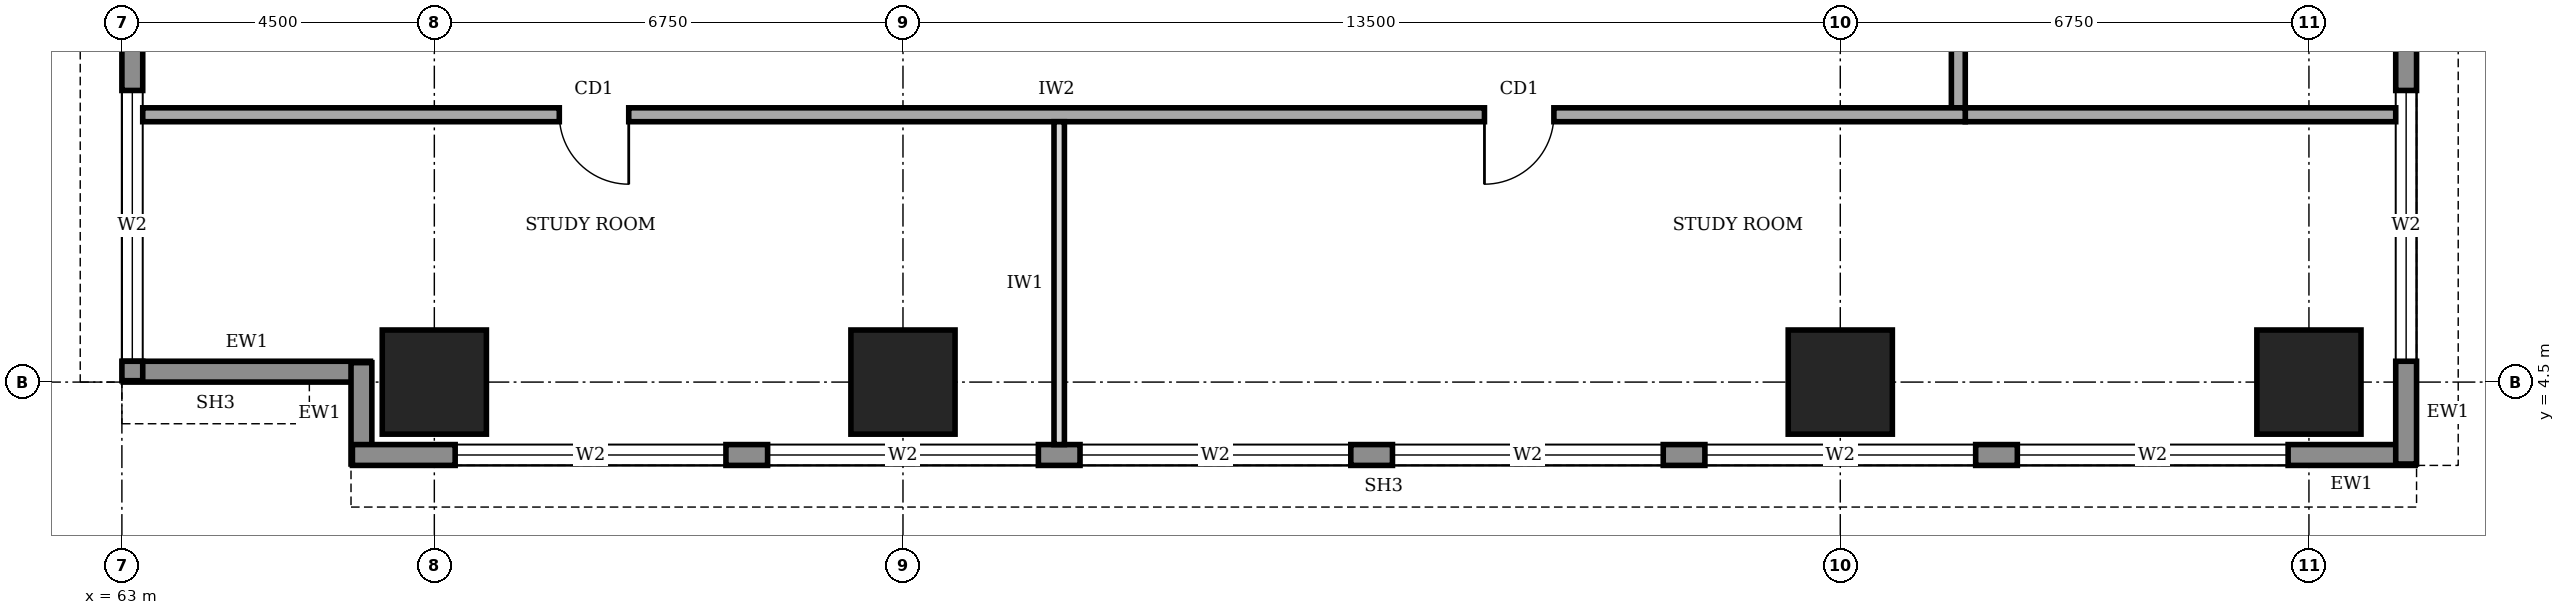
"""IFC4 building model, lengths in metres.
Left out: names, types, materials, properties, quantities, classifications, styles, units other than length and angle.
Written with IfcOpenShell. Run it as: python <this file> out.ifc"""

import sys

from ifc_helpers import new_model, si_unit, direction, frame, frame_2d, origin, origin_2d, place, context, subcontext, project, spatial, rectangle, extrude, element, fill, save


model = new_model("IFC4")
c1 = context("Model", 3, precision=1e-05, world=origin(), true_north=direction((0.0, 1.0)))
c2 = subcontext(c1, "Body", "Model", "MODEL_VIEW")
j1 = project(units=[si_unit("LENGTHUNIT", "METRE"), si_unit("PLANEANGLEUNIT", "RADIAN")], contexts=[c1])
p1 = place(None, origin())
s1 = spatial("IfcSite", under=j1, at=p1, CompositionType="ELEMENT")
p2 = place(p1, origin())
s2 = spatial("IfcBuilding", under=s1, at=p2, CompositionType="ELEMENT")
p3 = place(p2, frame((0.0, 0.0, 153.0)))
s3 = spatial("IfcBuildingStorey", under=s2, at=p3, CompositionType="ELEMENT", Elevation=153.0)
for number, where, z_axis, x_axis in (
    (1, (67.5, 4.5, 0.0), (0.0, 0.0, 1.0), (1.0, 0.0, 0.0)),
    (2, (74.25, 4.5, 0.0), (0.0, 0.0, 1.0), (1.0, 0.0, 0.0)),
    (3, (87.75, 4.5, 0.0), (0.0, 0.0, 1.0), (1.0, 0.0, 0.0)),
    (4, (94.5, 4.5, 0.0), (0.0, 0.0, 1.0), (1.0, 0.0, 0.0)),
):
    element("IfcColumn", number, at=place(p3, frame(where, z_axis=z_axis, x_axis=x_axis)), inside=s3, PredefinedType="COLUMN", context=c2, shape_type="SweptSolid", body=[
        extrude(rectangle(XDim=1.5, YDim=1.5, at=origin_2d()), origin(), (0.0, 0.0, 1.0), 4.0),
    ])
p4 = place(p3, frame((63.02, 4.65, 0.0), z_axis=(0.0, 0.0, 1.0), x_axis=(1.0, 0.0, 0.0)))
e5 = element("IfcWall", 5, at=p4, inside=s3, PredefinedType="STANDARD", context=c2, shape_type="SweptSolid", body=[
    extrude(rectangle(XDim=3.56, YDim=0.3, at=frame_2d((1.78, 0.0))), origin(), (0.0, 0.0, 1.0), 2.85),
])
p5 = place(p3, frame((66.45, 4.78, 0.0), z_axis=(0.0, 0.0, 1.0), x_axis=(0.0, -1.0, 0.0)))
e6 = element("IfcWall", 6, at=p5, inside=s3, PredefinedType="STANDARD", context=c2, shape_type="SweptSolid", body=[
    extrude(rectangle(XDim=1.46, YDim=0.3, at=frame_2d((0.73, 0.0))), origin(), (0.0, 0.0, 1.0), 3.75),
])
p6 = place(p3, frame((66.32, 3.45, 0.0), z_axis=(0.0, 0.0, 1.0), x_axis=(1.0, 0.0, 0.0)))
e7 = element("IfcWall", 7, at=p6, inside=s3, PredefinedType="STANDARD", context=c2, shape_type="SweptSolid", body=[
    extrude(rectangle(XDim=29.71, YDim=0.3, at=frame_2d((14.855, 0.0))), origin(), (0.0, 0.0, 1.0), 3.75),
])
p7 = place(p6, frame((1.48, 0.0, 0.6)))
e8 = element("IfcOpeningElement", 8, at=p7, cuts=e7, PredefinedType="OPENING", context=c2, shape_type="SweptSolid", body=[
    extrude(rectangle(XDim=3.9, YDim=2.6, at=frame_2d((1.95, 1.3))), frame((0.0, 0.16, 0.0), z_axis=(0.0, -1.0, 0.0), x_axis=(1.0, 0.0, 0.0)), (0.0, 0.0, 1.0), 0.32),
])
p8 = place(p6, frame((5.98, 0.0, 0.6)))
e9 = element("IfcOpeningElement", 9, at=p8, cuts=e7, PredefinedType="OPENING", context=c2, shape_type="SweptSolid", body=[
    extrude(rectangle(XDim=3.9, YDim=2.6, at=frame_2d((1.95, 1.3))), frame((0.0, 0.16, 0.0), z_axis=(0.0, -1.0, 0.0), x_axis=(1.0, 0.0, 0.0)), (0.0, 0.0, 1.0), 0.32),
])
p9 = place(p6, frame((10.48, 0.0, 0.6)))
e10 = element("IfcOpeningElement", 10, at=p9, cuts=e7, PredefinedType="OPENING", context=c2, shape_type="SweptSolid", body=[
    extrude(rectangle(XDim=3.9, YDim=2.6, at=frame_2d((1.95, 1.3))), frame((0.0, 0.16, 0.0), z_axis=(0.0, -1.0, 0.0), x_axis=(1.0, 0.0, 0.0)), (0.0, 0.0, 1.0), 0.32),
])
p10 = place(p6, frame((14.98, 0.0, 0.6)))
e11 = element("IfcOpeningElement", 11, at=p10, cuts=e7, PredefinedType="OPENING", context=c2, shape_type="SweptSolid", body=[
    extrude(rectangle(XDim=3.9, YDim=2.6, at=frame_2d((1.95, 1.3))), frame((0.0, 0.16, 0.0), z_axis=(0.0, -1.0, 0.0), x_axis=(1.0, 0.0, 0.0)), (0.0, 0.0, 1.0), 0.32),
])
p11 = place(p6, frame((19.48, 0.0, 0.6)))
e12 = element("IfcOpeningElement", 12, at=p11, cuts=e7, PredefinedType="OPENING", context=c2, shape_type="SweptSolid", body=[
    extrude(rectangle(XDim=3.9, YDim=2.6, at=frame_2d((1.95, 1.3))), frame((0.0, 0.16, 0.0), z_axis=(0.0, -1.0, 0.0), x_axis=(1.0, 0.0, 0.0)), (0.0, 0.0, 1.0), 0.32),
])
p12 = place(p6, frame((23.98, 0.0, 0.6)))
e13 = element("IfcOpeningElement", 13, at=p12, cuts=e7, PredefinedType="OPENING", context=c2, shape_type="SweptSolid", body=[
    extrude(rectangle(XDim=3.9, YDim=2.6, at=frame_2d((1.95, 1.3))), frame((0.0, 0.16, 0.0), z_axis=(0.0, -1.0, 0.0), x_axis=(1.0, 0.0, 0.0)), (0.0, 0.0, 1.0), 0.32),
])
p13 = place(p3, frame((95.9, 3.32, 0.0), z_axis=(0.0, 0.0, 1.0), x_axis=(0.0, 1.0, 0.0)))
e14 = element("IfcWall", 14, at=p13, inside=s3, PredefinedType="STANDARD", context=c2, shape_type="SweptSolid", body=[
    extrude(rectangle(XDim=33.86, YDim=0.3, at=frame_2d((16.93, 0.0))), origin(), (0.0, 0.0, 1.0), 3.75),
])
p14 = place(p13, frame((1.48, 0.0, 0.6)))
e15 = element("IfcOpeningElement", 15, at=p14, cuts=e14, PredefinedType="OPENING", context=c2, shape_type="SweptSolid", body=[
    extrude(rectangle(XDim=3.9, YDim=2.6, at=frame_2d((1.95, 1.3))), frame((0.0, 0.16, 0.0), z_axis=(0.0, -1.0, 0.0), x_axis=(1.0, 0.0, 0.0)), (0.0, 0.0, 1.0), 0.32),
])
p15 = place(p13, frame((5.98, 0.0, 0.6)))
e16 = element("IfcOpeningElement", 16, at=p15, cuts=e14, PredefinedType="OPENING", context=c2, shape_type="SweptSolid", body=[
    extrude(rectangle(XDim=3.9, YDim=2.6, at=frame_2d((1.95, 1.3))), frame((0.0, 0.16, 0.0), z_axis=(0.0, -1.0, 0.0), x_axis=(1.0, 0.0, 0.0)), (0.0, 0.0, 1.0), 0.32),
])
p16 = place(p13, frame((10.48, 0.0, 0.6)))
e17 = element("IfcOpeningElement", 17, at=p16, cuts=e14, PredefinedType="OPENING", context=c2, shape_type="SweptSolid", body=[
    extrude(rectangle(XDim=3.9, YDim=2.6, at=frame_2d((1.95, 1.3))), frame((0.0, 0.16, 0.0), z_axis=(0.0, -1.0, 0.0), x_axis=(1.0, 0.0, 0.0)), (0.0, 0.0, 1.0), 0.32),
])
p17 = place(p13, frame((14.98, 0.0, 0.6)))
e18 = element("IfcOpeningElement", 18, at=p17, cuts=e14, PredefinedType="OPENING", context=c2, shape_type="SweptSolid", body=[
    extrude(rectangle(XDim=3.9, YDim=2.6, at=frame_2d((1.95, 1.3))), frame((0.0, 0.16, 0.0), z_axis=(0.0, -1.0, 0.0), x_axis=(1.0, 0.0, 0.0)), (0.0, 0.0, 1.0), 0.32),
])
p18 = place(p13, frame((19.48, 0.0, 0.6)))
e19 = element("IfcOpeningElement", 19, at=p18, cuts=e14, PredefinedType="OPENING", context=c2, shape_type="SweptSolid", body=[
    extrude(rectangle(XDim=3.9, YDim=2.6, at=frame_2d((1.95, 1.3))), frame((0.0, 0.16, 0.0), z_axis=(0.0, -1.0, 0.0), x_axis=(1.0, 0.0, 0.0)), (0.0, 0.0, 1.0), 0.32),
])
p19 = place(p13, frame((23.98, 0.0, 0.6)))
e20 = element("IfcOpeningElement", 20, at=p19, cuts=e14, PredefinedType="OPENING", context=c2, shape_type="SweptSolid", body=[
    extrude(rectangle(XDim=3.9, YDim=2.6, at=frame_2d((1.95, 1.3))), frame((0.0, 0.16, 0.0), z_axis=(0.0, -1.0, 0.0), x_axis=(1.0, 0.0, 0.0)), (0.0, 0.0, 1.0), 0.32),
])
p20 = place(p13, frame((28.48, 0.0, 0.6)))
e21 = element("IfcOpeningElement", 21, at=p20, cuts=e14, PredefinedType="OPENING", context=c2, shape_type="SweptSolid", body=[
    extrude(rectangle(XDim=3.9, YDim=2.6, at=frame_2d((1.95, 1.3))), frame((0.0, 0.16, 0.0), z_axis=(0.0, -1.0, 0.0), x_axis=(1.0, 0.0, 0.0)), (0.0, 0.0, 1.0), 0.32),
])
p21 = place(p3, frame((63.15, 35.98, 0.0), z_axis=(0.0, 0.0, 1.0), x_axis=(0.0, -1.0, 0.0)))
e22 = element("IfcWall", 22, at=p21, inside=s3, PredefinedType="STANDARD", context=c2, shape_type="SweptSolid", body=[
    extrude(rectangle(XDim=31.46, YDim=0.3, at=frame_2d((15.73, 0.0))), origin(), (0.0, 0.0, 1.0), 3.75),
])
p22 = place(p21, frame((27.28, 0.0, 0.6)))
e23 = element("IfcOpeningElement", 23, at=p22, cuts=e22, PredefinedType="OPENING", context=c2, shape_type="SweptSolid", body=[
    extrude(rectangle(XDim=3.9, YDim=2.6, at=frame_2d((1.95, 1.3))), frame((0.0, 0.16, 0.0), z_axis=(0.0, -1.0, 0.0), x_axis=(1.0, 0.0, 0.0)), (0.0, 0.0, 1.0), 0.32),
])
p23 = place(p21, frame((22.78, 0.0, 0.6)))
e24 = element("IfcOpeningElement", 24, at=p23, cuts=e22, PredefinedType="OPENING", context=c2, shape_type="SweptSolid", body=[
    extrude(rectangle(XDim=3.9, YDim=2.6, at=frame_2d((1.95, 1.3))), frame((0.0, 0.16, 0.0), z_axis=(0.0, -1.0, 0.0), x_axis=(1.0, 0.0, 0.0)), (0.0, 0.0, 1.0), 0.32),
])
p24 = place(p21, frame((18.28, 0.0, 0.6)))
e25 = element("IfcOpeningElement", 25, at=p24, cuts=e22, PredefinedType="OPENING", context=c2, shape_type="SweptSolid", body=[
    extrude(rectangle(XDim=3.9, YDim=2.6, at=frame_2d((1.95, 1.3))), frame((0.0, 0.16, 0.0), z_axis=(0.0, -1.0, 0.0), x_axis=(1.0, 0.0, 0.0)), (0.0, 0.0, 1.0), 0.32),
])
p25 = place(p21, frame((13.78, 0.0, 0.6)))
e26 = element("IfcOpeningElement", 26, at=p25, cuts=e22, PredefinedType="OPENING", context=c2, shape_type="SweptSolid", body=[
    extrude(rectangle(XDim=3.9, YDim=2.6, at=frame_2d((1.95, 1.3))), frame((0.0, 0.16, 0.0), z_axis=(0.0, -1.0, 0.0), x_axis=(1.0, 0.0, 0.0)), (0.0, 0.0, 1.0), 0.32),
])
p26 = place(p21, frame((9.28, 0.0, 0.6)))
e27 = element("IfcOpeningElement", 27, at=p26, cuts=e22, PredefinedType="OPENING", context=c2, shape_type="SweptSolid", body=[
    extrude(rectangle(XDim=3.9, YDim=2.6, at=frame_2d((1.95, 1.3))), frame((0.0, 0.16, 0.0), z_axis=(0.0, -1.0, 0.0), x_axis=(1.0, 0.0, 0.0)), (0.0, 0.0, 1.0), 0.32),
])
p27 = place(p21, frame((4.78, 0.0, 0.6)))
e28 = element("IfcOpeningElement", 28, at=p27, cuts=e22, PredefinedType="OPENING", context=c2, shape_type="SweptSolid", body=[
    extrude(rectangle(XDim=3.9, YDim=2.6, at=frame_2d((1.95, 1.3))), frame((0.0, 0.16, 0.0), z_axis=(0.0, -1.0, 0.0), x_axis=(1.0, 0.0, 0.0)), (0.0, 0.0, 1.0), 0.32),
])
p28 = place(p3, frame((63.3, 8.35, 0.0), z_axis=(0.0, 0.0, 1.0), x_axis=(1.0, 0.0, 0.0)))
e29 = element("IfcWall", 29, at=p28, inside=s3, PredefinedType="SOLIDWALL", context=c2, shape_type="SweptSolid", body=[
    extrude(rectangle(XDim=26.25, YDim=0.2, at=frame_2d((13.125, 0.0))), origin(), (0.0, 0.0, 1.0), 3.75),
])
p29 = place(p28, frame((6.0, 0.0, 0.0)))
e30 = element("IfcOpeningElement", 30, at=p29, cuts=e29, PredefinedType="OPENING", context=c2, shape_type="SweptSolid", body=[
    extrude(rectangle(XDim=1.0, YDim=2.1, at=frame_2d((0.5, 1.05))), frame((0.0, 0.11, 0.0), z_axis=(0.0, -1.0, 0.0), x_axis=(1.0, 0.0, 0.0)), (0.0, 0.0, 1.0), 0.22),
])
p30 = place(p28, frame((19.325, 0.0, 0.0)))
e31 = element("IfcOpeningElement", 31, at=p30, cuts=e29, PredefinedType="OPENING", context=c2, shape_type="SweptSolid", body=[
    extrude(rectangle(XDim=1.0, YDim=2.1, at=frame_2d((0.5, 1.05))), frame((0.0, 0.11, 0.0), z_axis=(0.0, -1.0, 0.0), x_axis=(1.0, 0.0, 0.0)), (0.0, 0.0, 1.0), 0.22),
])
p31 = place(p3, frame((89.45, 8.45, 0.0), z_axis=(0.0, 0.0, 1.0), x_axis=(0.0, 1.0, 0.0)))
e32 = element("IfcWall", 32, at=p31, inside=s3, PredefinedType="SOLIDWALL", context=c2, shape_type="SweptSolid", body=[
    extrude(rectangle(XDim=23.8, YDim=0.2, at=frame_2d((11.9, 0.0))), origin(), (0.0, 0.0, 1.0), 3.75),
])
p32 = place(p31, frame((1.925, 0.0, 0.0)))
e33 = element("IfcOpeningElement", 33, at=p32, cuts=e32, PredefinedType="OPENING", context=c2, shape_type="SweptSolid", body=[
    extrude(rectangle(XDim=1.0, YDim=2.1, at=frame_2d((0.5, 1.05))), frame((0.0, 0.11, 0.0), z_axis=(0.0, -1.0, 0.0), x_axis=(1.0, 0.0, 0.0)), (0.0, 0.0, 1.0), 0.22),
])
p33 = place(p31, frame((5.65, 0.0, 0.0)))
e34 = element("IfcOpeningElement", 34, at=p33, cuts=e32, PredefinedType="OPENING", context=c2, shape_type="SweptSolid", body=[
    extrude(rectangle(XDim=1.0, YDim=2.1, at=frame_2d((0.5, 1.05))), frame((0.0, 0.11, 0.0), z_axis=(0.0, -1.0, 0.0), x_axis=(1.0, 0.0, 0.0)), (0.0, 0.0, 1.0), 0.22),
])
p34 = place(p31, frame((8.75, 0.0, 0.0)))
e35 = element("IfcOpeningElement", 35, at=p34, cuts=e32, PredefinedType="OPENING", context=c2, shape_type="SweptSolid", body=[
    extrude(rectangle(XDim=0.9, YDim=2.1, at=frame_2d((0.45, 1.05))), frame((0.0, 0.11, 0.0), z_axis=(0.0, -1.0, 0.0), x_axis=(1.0, 0.0, 0.0)), (0.0, 0.0, 1.0), 0.22),
])
p35 = place(p31, frame((11.8, 0.0, 0.0)))
e36 = element("IfcOpeningElement", 36, at=p35, cuts=e32, PredefinedType="OPENING", context=c2, shape_type="SweptSolid", body=[
    extrude(rectangle(XDim=0.9, YDim=2.1, at=frame_2d((0.45, 1.05))), frame((0.0, 0.11, 0.0), z_axis=(0.0, -1.0, 0.0), x_axis=(1.0, 0.0, 0.0)), (0.0, 0.0, 1.0), 0.22),
])
p36 = place(p31, frame((16.5, 0.0, 0.0)))
e37 = element("IfcOpeningElement", 37, at=p36, cuts=e32, PredefinedType="OPENING", context=c2, shape_type="SweptSolid", body=[
    extrude(rectangle(XDim=0.9, YDim=2.1, at=frame_2d((0.45, 1.05))), frame((0.0, 0.11, 0.0), z_axis=(0.0, -1.0, 0.0), x_axis=(1.0, 0.0, 0.0)), (0.0, 0.0, 1.0), 0.22),
])
p37 = place(p31, frame((13.85, 0.0, 0.0)))
e38 = element("IfcOpeningElement", 38, at=p37, cuts=e32, PredefinedType="OPENING", context=c2, shape_type="SweptSolid", body=[
    extrude(rectangle(XDim=1.0, YDim=2.1, at=frame_2d((0.5, 1.05))), frame((0.0, 0.11, 0.0), z_axis=(0.0, -1.0, 0.0), x_axis=(1.0, 0.0, 0.0)), (0.0, 0.0, 1.0), 0.22),
])
p38 = place(p31, frame((20.675, 0.0, 0.0)))
e39 = element("IfcOpeningElement", 39, at=p38, cuts=e32, PredefinedType="OPENING", context=c2, shape_type="SweptSolid", body=[
    extrude(rectangle(XDim=1.0, YDim=2.1, at=frame_2d((0.5, 1.05))), frame((0.0, 0.11, 0.0), z_axis=(0.0, -1.0, 0.0), x_axis=(1.0, 0.0, 0.0)), (0.0, 0.0, 1.0), 0.22),
])
p39 = place(p3, frame((89.55, 8.35, 0.0), z_axis=(0.0, 0.0, 1.0), x_axis=(1.0, 0.0, 0.0)))
e40 = element("IfcWall", 40, at=p39, inside=s3, PredefinedType="SOLIDWALL", context=c2, shape_type="SweptSolid", body=[
    extrude(rectangle(XDim=6.2, YDim=0.2, at=frame_2d((3.1, 0.0))), origin(), (0.0, 0.0, 1.0), 3.75),
])
p40 = place(p3, frame((76.5, 3.6, 0.0), z_axis=(0.0, 0.0, 1.0), x_axis=(0.0, 1.0, 0.0)))
e41 = element("IfcWall", 41, at=p40, inside=s3, PredefinedType="PARTITIONING", context=c2, shape_type="SweptSolid", body=[
    extrude(rectangle(XDim=4.65, YDim=0.15, at=frame_2d((2.325, 0.0))), origin(), (0.0, 0.0, 1.0), 3.75),
])
p41 = place(p7, origin())
e42 = element("IfcWindow", 42, at=p41, inside=s3, PartitioningType="SINGLE_PANEL", PredefinedType="WINDOW", context=c2, shape_type="SweptSolid", body=[
    extrude(rectangle(XDim=3.9, YDim=2.6, at=frame_2d((1.95, 1.3))), frame((0.0, 0.03, 0.0), z_axis=(0.0, -1.0, 0.0), x_axis=(1.0, 0.0, 0.0)), (0.0, 0.0, 1.0), 0.06),
])
fill(e8, e42)
p42 = place(p8, origin())
e43 = element("IfcWindow", 43, at=p42, inside=s3, PartitioningType="SINGLE_PANEL", PredefinedType="WINDOW", context=c2, shape_type="SweptSolid", body=[
    extrude(rectangle(XDim=3.9, YDim=2.6, at=frame_2d((1.95, 1.3))), frame((0.0, 0.03, 0.0), z_axis=(0.0, -1.0, 0.0), x_axis=(1.0, 0.0, 0.0)), (0.0, 0.0, 1.0), 0.06),
])
fill(e9, e43)
p43 = place(p9, origin())
e44 = element("IfcWindow", 44, at=p43, inside=s3, PartitioningType="SINGLE_PANEL", PredefinedType="WINDOW", context=c2, shape_type="SweptSolid", body=[
    extrude(rectangle(XDim=3.9, YDim=2.6, at=frame_2d((1.95, 1.3))), frame((0.0, 0.03, 0.0), z_axis=(0.0, -1.0, 0.0), x_axis=(1.0, 0.0, 0.0)), (0.0, 0.0, 1.0), 0.06),
])
fill(e10, e44)
p44 = place(p10, origin())
e45 = element("IfcWindow", 45, at=p44, inside=s3, PartitioningType="SINGLE_PANEL", PredefinedType="WINDOW", context=c2, shape_type="SweptSolid", body=[
    extrude(rectangle(XDim=3.9, YDim=2.6, at=frame_2d((1.95, 1.3))), frame((0.0, 0.03, 0.0), z_axis=(0.0, -1.0, 0.0), x_axis=(1.0, 0.0, 0.0)), (0.0, 0.0, 1.0), 0.06),
])
fill(e11, e45)
p45 = place(p11, origin())
e46 = element("IfcWindow", 46, at=p45, inside=s3, PartitioningType="SINGLE_PANEL", PredefinedType="WINDOW", context=c2, shape_type="SweptSolid", body=[
    extrude(rectangle(XDim=3.9, YDim=2.6, at=frame_2d((1.95, 1.3))), frame((0.0, 0.03, 0.0), z_axis=(0.0, -1.0, 0.0), x_axis=(1.0, 0.0, 0.0)), (0.0, 0.0, 1.0), 0.06),
])
fill(e12, e46)
p46 = place(p12, origin())
e47 = element("IfcWindow", 47, at=p46, inside=s3, PartitioningType="SINGLE_PANEL", PredefinedType="WINDOW", context=c2, shape_type="SweptSolid", body=[
    extrude(rectangle(XDim=3.9, YDim=2.6, at=frame_2d((1.95, 1.3))), frame((0.0, 0.03, 0.0), z_axis=(0.0, -1.0, 0.0), x_axis=(1.0, 0.0, 0.0)), (0.0, 0.0, 1.0), 0.06),
])
fill(e13, e47)
p47 = place(p14, origin())
e48 = element("IfcWindow", 48, at=p47, inside=s3, PartitioningType="SINGLE_PANEL", PredefinedType="WINDOW", context=c2, shape_type="SweptSolid", body=[
    extrude(rectangle(XDim=3.9, YDim=2.6, at=frame_2d((1.95, 1.3))), frame((0.0, 0.03, 0.0), z_axis=(0.0, -1.0, 0.0), x_axis=(1.0, 0.0, 0.0)), (0.0, 0.0, 1.0), 0.06),
])
fill(e15, e48)
p48 = place(p22, origin())
e49 = element("IfcWindow", 49, at=p48, inside=s3, PartitioningType="SINGLE_PANEL", PredefinedType="WINDOW", context=c2, shape_type="SweptSolid", body=[
    extrude(rectangle(XDim=3.9, YDim=2.6, at=frame_2d((1.95, 1.3))), frame((0.0, 0.03, 0.0), z_axis=(0.0, -1.0, 0.0), x_axis=(1.0, 0.0, 0.0)), (0.0, 0.0, 1.0), 0.06),
])
fill(e23, e49)
p49 = place(p29, frame((1.0, 0.0, 0.0), z_axis=(0.0, 0.0, 1.0), x_axis=(-1.0, 0.0, 0.0)))
e50 = element("IfcDoor", 50, at=p49, inside=s3, OperationType="SINGLE_SWING_LEFT", PredefinedType="DOOR", context=c2, shape_type="SweptSolid", body=[
    extrude(rectangle(XDim=1.0, YDim=2.1, at=frame_2d((0.5, 1.05))), frame((0.0, 0.025, 0.0), z_axis=(0.0, -1.0, 0.0), x_axis=(1.0, 0.0, 0.0)), (0.0, 0.0, 1.0), 0.05),
])
fill(e30, e50)
p50 = place(p30, frame((1.0, 0.0, 0.0), z_axis=(0.0, 0.0, 1.0), x_axis=(-1.0, 0.0, 0.0)))
e51 = element("IfcDoor", 51, at=p50, inside=s3, OperationType="SINGLE_SWING_RIGHT", PredefinedType="DOOR", context=c2, shape_type="SweptSolid", body=[
    extrude(rectangle(XDim=1.0, YDim=2.1, at=frame_2d((0.5, 1.05))), frame((0.0, 0.025, 0.0), z_axis=(0.0, -1.0, 0.0), x_axis=(1.0, 0.0, 0.0)), (0.0, 0.0, 1.0), 0.05),
])
fill(e31, e51)
save(model, sys.argv[1])
